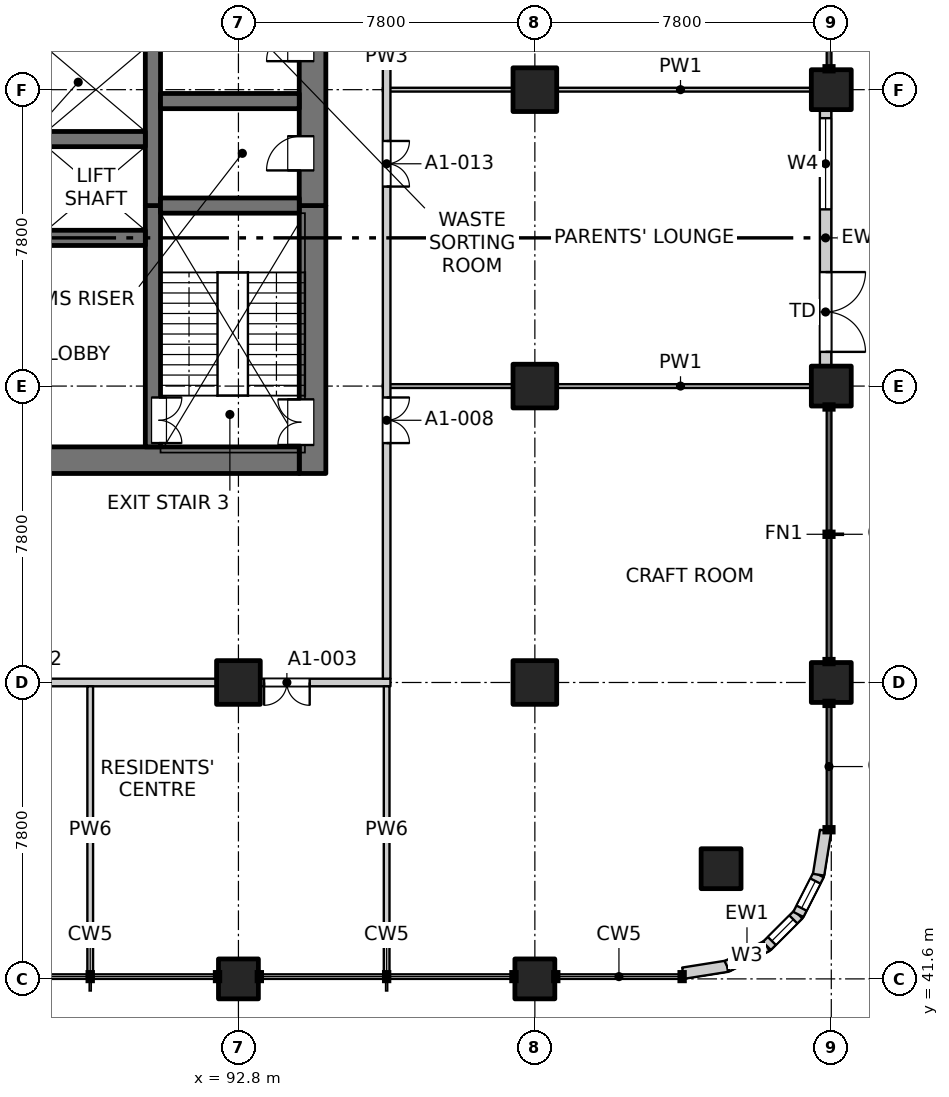
"""IFC4 building model, lengths in metres.
Left out: names, types, materials, properties, quantities, classifications, styles, units other than length and angle.
Written with IfcOpenShell. Run it as: python <this file> out.ifc"""

import sys

from ifc_helpers import new_model, si_unit, direction, frame, frame_2d, origin, origin_2d, place, context, subcontext, project, spatial, rectangle, extrude, element, fill, save


model = new_model("IFC4")
c1 = context("Model", 3, precision=1e-05, world=origin(), true_north=direction((0.0, 1.0)))
c2 = subcontext(c1, "Body", "Model", "MODEL_VIEW")
j1 = project(units=[si_unit("LENGTHUNIT", "METRE"), si_unit("PLANEANGLEUNIT", "RADIAN")], contexts=[c1])
p1 = place(None, origin())
s1 = spatial("IfcSite", under=j1, at=p1, CompositionType="ELEMENT")
p2 = place(p1, origin())
s2 = spatial("IfcBuilding", under=s1, at=p2, CompositionType="ELEMENT")
p3 = place(p2, frame((0.0, 0.0, 15.0)))
s3 = spatial("IfcBuildingStorey", under=s2, at=p3, CompositionType="ELEMENT", Elevation=15.0)
for number, where, z_axis, x_axis in (
    (1, (105.5, 44.5, -0.35), (0.0, 0.0, 1.0), (1.0, 0.0, 0.0)),
    (2, (108.4, 49.4, -0.35), (0.0, 0.0, 1.0), (1.0, 0.0, 0.0)),
    (3, (108.4, 57.2, -0.35), (0.0, 0.0, 1.0), (1.0, 0.0, 0.0)),
    (4, (108.4, 65.0, -0.35), (0.0, 0.0, 1.0), (1.0, 0.0, 0.0)),
    (5, (92.8, 41.6, -0.35), (0.0, 0.0, 1.0), (1.0, 0.0, 0.0)),
    (6, (100.6, 41.6, -0.35), (0.0, 0.0, 1.0), (1.0, 0.0, 0.0)),
):
    element("IfcColumn", number, at=place(p3, frame(where, z_axis=z_axis, x_axis=x_axis)), inside=s3, PredefinedType="COLUMN", context=c2, shape_type="SweptSolid", body=[
        extrude(rectangle(XDim=1.05, YDim=1.05, at=origin_2d()), origin(), (0.0, 0.0, 1.0), 4.6),
    ])
for number, where, z_axis, x_axis in (
    (7, (92.8, 49.4, -0.35), (0.0, 0.0, 1.0), (1.0, 0.0, 0.0)),
    (8, (100.6, 49.4, -0.35), (0.0, 0.0, 1.0), (1.0, 0.0, 0.0)),
    (9, (100.6, 57.2, -0.35), (0.0, 0.0, 1.0), (1.0, 0.0, 0.0)),
    (10, (100.6, 65.0, -0.35), (0.0, 0.0, 1.0), (1.0, 0.0, 0.0)),
):
    element("IfcColumn", number, at=place(p3, frame(where, z_axis=z_axis, x_axis=x_axis)), inside=s3, PredefinedType="COLUMN", context=c2, shape_type="SweptSolid", body=[
        extrude(rectangle(XDim=1.15, YDim=1.15, at=origin_2d()), origin(), (0.0, 0.0, 1.0), 4.6),
    ])
p4 = place(p3, frame((94.75, 54.9, -0.35), z_axis=(0.0, 0.0, 1.0), x_axis=(0.0, 1.0, 0.0)))
e11 = element("IfcWall", 11, at=p4, inside=s3, PredefinedType="SOLIDWALL", context=c2, shape_type="SweptSolid", body=[
    extrude(rectangle(XDim=7.05, YDim=0.7, at=frame_2d((3.525, 0.0))), origin(), (0.0, 0.0, 1.0), 4.6),
])
p5 = place(p4, frame((0.75, 0.0, 0.35)))
e12 = element("IfcOpeningElement", 12, at=p5, cuts=e11, PredefinedType="OPENING", context=c2, shape_type="SweptSolid", body=[
    extrude(rectangle(XDim=1.2, YDim=2.1, at=frame_2d((0.6, 1.05))), frame((0.0, 0.36, 0.0), z_axis=(0.0, -1.0, 0.0), x_axis=(1.0, 0.0, 0.0)), (0.0, 0.0, 1.0), 0.72),
])
p6 = place(p3, frame((94.75, 61.95, -0.35), z_axis=(0.0, 0.0, 1.0), x_axis=(0.0, 1.0, 0.0)))
e13 = element("IfcWall", 13, at=p6, inside=s3, PredefinedType="SOLIDWALL", context=c2, shape_type="SweptSolid", body=[
    extrude(rectangle(XDim=15.35, YDim=0.7, at=frame_2d((7.675, 0.0))), origin(), (0.0, 0.0, 1.0), 4.6),
])
p7 = place(p6, frame((0.925, 0.0, 0.35)))
e14 = element("IfcOpeningElement", 14, at=p7, cuts=e13, PredefinedType="OPENING", context=c2, shape_type="SweptSolid", body=[
    extrude(rectangle(XDim=0.9, YDim=2.1, at=frame_2d((0.45, 1.05))), frame((0.0, 0.36, 0.0), z_axis=(0.0, -1.0, 0.0), x_axis=(1.0, 0.0, 0.0)), (0.0, 0.0, 1.0), 0.72),
])
p8 = place(p6, frame((3.8, 0.0, 0.35)))
e15 = element("IfcOpeningElement", 15, at=p8, cuts=e13, PredefinedType="OPENING", context=c2, shape_type="SweptSolid", body=[
    extrude(rectangle(XDim=0.9, YDim=2.1, at=frame_2d((0.45, 1.05))), frame((0.0, 0.36, 0.0), z_axis=(0.0, -1.0, 0.0), x_axis=(1.0, 0.0, 0.0)), (0.0, 0.0, 1.0), 0.72),
])
p9 = place(p6, frame((6.8, 0.0, 0.35)))
e16 = element("IfcOpeningElement", 16, at=p9, cuts=e13, PredefinedType="OPENING", context=c2, shape_type="SweptSolid", body=[
    extrude(rectangle(XDim=0.9, YDim=2.1, at=frame_2d((0.45, 1.05))), frame((0.0, 0.36, 0.0), z_axis=(0.0, -1.0, 0.0), x_axis=(1.0, 0.0, 0.0)), (0.0, 0.0, 1.0), 0.72),
])
p10 = place(p6, frame((9.8, 0.0, 0.35)))
e17 = element("IfcOpeningElement", 17, at=p10, cuts=e13, PredefinedType="OPENING", context=c2, shape_type="SweptSolid", body=[
    extrude(rectangle(XDim=0.9, YDim=2.1, at=frame_2d((0.45, 1.05))), frame((0.0, 0.36, 0.0), z_axis=(0.0, -1.0, 0.0), x_axis=(1.0, 0.0, 0.0)), (0.0, 0.0, 1.0), 0.72),
])
p11 = place(p6, frame((13.1, 0.0, 0.35)))
e18 = element("IfcOpeningElement", 18, at=p11, cuts=e13, PredefinedType="OPENING", context=c2, shape_type="SweptSolid", body=[
    extrude(rectangle(XDim=0.9, YDim=2.1, at=frame_2d((0.45, 1.05))), frame((0.0, 0.36, 0.0), z_axis=(0.0, -1.0, 0.0), x_axis=(1.0, 0.0, 0.0)), (0.0, 0.0, 1.0), 0.72),
])
p12 = place(p3, frame((75.6, 55.25, -0.35), z_axis=(0.0, 0.0, 1.0), x_axis=(1.0, 0.0, 0.0)))
e19 = element("IfcWall", 19, at=p12, inside=s3, PredefinedType="SOLIDWALL", context=c2, shape_type="SweptSolid", body=[
    extrude(rectangle(XDim=18.8, YDim=0.7, at=frame_2d((9.4, 0.0))), origin(), (0.0, 0.0, 1.0), 4.6),
])
p13 = place(p12, frame((8.65, 0.0, 0.35)))
e20 = element("IfcOpeningElement", 20, at=p13, cuts=e19, PredefinedType="OPENING", context=c2, shape_type="SweptSolid", body=[
    extrude(rectangle(XDim=1.5, YDim=2.1, at=frame_2d((0.75, 1.05))), frame((0.0, 0.36, 0.0), z_axis=(0.0, -1.0, 0.0), x_axis=(1.0, 0.0, 0.0)), (0.0, 0.0, 1.0), 0.72),
])
p14 = place(p3, frame((90.55, 55.6, -0.35), z_axis=(0.0, 0.0, 1.0), x_axis=(0.0, 1.0, 0.0)))
e21 = element("IfcWall", 21, at=p14, inside=s3, PredefinedType="SOLIDWALL", context=c2, shape_type="SweptSolid", body=[
    extrude(rectangle(XDim=6.35, YDim=0.4, at=frame_2d((3.175, 0.0))), origin(), (0.0, 0.0, 1.0), 4.6),
])
p15 = place(p14, frame((0.1, 0.0, 0.35)))
e22 = element("IfcOpeningElement", 22, at=p15, cuts=e21, PredefinedType="OPENING", context=c2, shape_type="SweptSolid", body=[
    extrude(rectangle(XDim=1.2, YDim=2.1, at=frame_2d((0.6, 1.05))), frame((0.0, 0.21, 0.0), z_axis=(0.0, -1.0, 0.0), x_axis=(1.0, 0.0, 0.0)), (0.0, 0.0, 1.0), 0.42),
])
p16 = place(p3, frame((90.55, 61.95, -0.35), z_axis=(0.0, 0.0, 1.0), x_axis=(0.0, 1.0, 0.0)))
e23 = element("IfcWall", 23, at=p16, inside=s3, PredefinedType="SOLIDWALL", context=c2, shape_type="SweptSolid", body=[
    extrude(rectangle(XDim=15.35, YDim=0.4, at=frame_2d((7.675, 0.0))), origin(), (0.0, 0.0, 1.0), 4.6),
])
for number, where, z_axis, x_axis in (
    (24, (87.35, 61.1, -0.35), (0.0, 0.0, 1.0), (1.0, 0.0, 0.0)),
    (25, (87.35, 63.7, -0.35), (0.0, 0.0, 1.0), (1.0, 0.0, 0.0)),
):
    element("IfcWall", number, at=place(p3, frame(where, z_axis=z_axis, x_axis=x_axis)), inside=s3, PredefinedType="SOLIDWALL", context=c2, shape_type="SweptSolid", body=[
        extrude(rectangle(XDim=3.0, YDim=0.4, at=frame_2d((1.5, 0.0))), origin(), (0.0, 0.0, 1.0), 4.6),
    ])
for number, where, z_axis, x_axis in (
    (26, (90.75, 61.95, -0.35), (0.0, 0.0, 1.0), (1.0, 0.0, 0.0)),
    (27, (90.75, 64.7, -0.35), (0.0, 0.0, 1.0), (1.0, 0.0, 0.0)),
):
    element("IfcWall", number, at=place(p3, frame(where, z_axis=z_axis, x_axis=x_axis)), inside=s3, PredefinedType="SOLIDWALL", context=c2, shape_type="SweptSolid", body=[
        extrude(rectangle(XDim=3.65, YDim=0.4, at=frame_2d((1.825, 0.0))), origin(), (0.0, 0.0, 1.0), 4.6),
    ])
p17 = place(p3, frame((108.25, 57.725, 0.0), z_axis=(0.0, 0.0, 1.0), x_axis=(0.0, 1.0, 0.0)))
e28 = element("IfcWall", 28, at=p17, inside=s3, PredefinedType="SOLIDWALL", context=c2, shape_type="SweptSolid", body=[
    extrude(rectangle(XDim=6.75, YDim=0.3, at=frame_2d((3.375, 0.0))), origin(), (0.0, 0.0, 1.0), 3.8),
])
p18 = place(p17, frame((0.375, 0.0, 0.0)))
e29 = element("IfcOpeningElement", 29, at=p18, cuts=e28, PredefinedType="OPENING", context=c2, shape_type="SweptSolid", body=[
    extrude(rectangle(XDim=2.1, YDim=2.4, at=frame_2d((1.05, 1.2))), frame((0.0, 0.16, 0.0), z_axis=(0.0, -1.0, 0.0), x_axis=(1.0, 0.0, 0.0)), (0.0, 0.0, 1.0), 0.32),
])
p19 = place(p17, frame((4.125, 0.0, 0.6)))
e30 = element("IfcOpeningElement", 30, at=p19, cuts=e28, PredefinedType="OPENING", context=c2, shape_type="SweptSolid", body=[
    extrude(rectangle(XDim=2.4, YDim=2.1, at=frame_2d((1.2, 1.05))), frame((0.0, 0.16, 0.0), z_axis=(0.0, -1.0, 0.0), x_axis=(1.0, 0.0, 0.0)), (0.0, 0.0, 1.0), 0.32),
])
p20 = place(p3, frame((104.5, 41.75, 0.0), z_axis=(0.0, 0.0, 1.0), x_axis=(0.987678452879, 0.156496880861, 0.0)))
e31 = element("IfcWall", 31, at=p20, inside=s3, PredefinedType="SOLIDWALL", context=c2, shape_type="SweptSolid", body=[
    extrude(rectangle(XDim=1.173, YDim=0.3, at=frame_2d((0.586, 0.0))), origin(), (0.0, 0.0, 1.0), 3.8),
])
p21 = place(p3, frame((105.659, 41.934, 0.0), z_axis=(0.0, 0.0, 1.0), x_axis=(0.890988677504, 0.454025524128, 0.0)))
e32 = element("IfcWall", 32, at=p21, inside=s3, PredefinedType="SOLIDWALL", context=c2, shape_type="SweptSolid", body=[
    extrude(rectangle(XDim=1.173, YDim=0.3, at=frame_2d((0.587, 0.0))), origin(), (0.0, 0.0, 1.0), 3.8),
])
p22 = place(p21, frame((0.187, 0.0, 0.9)))
e33 = element("IfcOpeningElement", 33, at=p22, cuts=e32, PredefinedType="OPENING", context=c2, shape_type="SweptSolid", body=[
    extrude(rectangle(XDim=0.8, YDim=1.2, at=frame_2d((0.4, 0.6))), frame((0.0, 0.16, 0.0), z_axis=(0.0, -1.0, 0.0), x_axis=(1.0, 0.0, 0.0)), (0.0, 0.0, 1.0), 0.32),
])
p23 = place(p3, frame((106.704, 42.466, 0.0), z_axis=(0.0, 0.0, 1.0), x_axis=(0.707106781187, 0.707106781187, 0.0)))
e34 = element("IfcWall", 34, at=p23, inside=s3, PredefinedType="SOLIDWALL", context=c2, shape_type="SweptSolid", body=[
    extrude(rectangle(XDim=1.173, YDim=0.3, at=frame_2d((0.586, 0.0))), origin(), (0.0, 0.0, 1.0), 3.8),
])
p24 = place(p23, frame((0.187, 0.0, 0.9)))
e35 = element("IfcOpeningElement", 35, at=p24, cuts=e34, PredefinedType="OPENING", context=c2, shape_type="SweptSolid", body=[
    extrude(rectangle(XDim=0.8, YDim=1.2, at=frame_2d((0.4, 0.6))), frame((0.0, 0.16, 0.0), z_axis=(0.0, -1.0, 0.0), x_axis=(1.0, 0.0, 0.0)), (0.0, 0.0, 1.0), 0.32),
])
p25 = place(p3, frame((107.534, 43.296, 0.0), z_axis=(0.0, 0.0, 1.0), x_axis=(0.454025524128, 0.890988677504, 0.0)))
e36 = element("IfcWall", 36, at=p25, inside=s3, PredefinedType="SOLIDWALL", context=c2, shape_type="SweptSolid", body=[
    extrude(rectangle(XDim=1.173, YDim=0.3, at=frame_2d((0.587, 0.0))), origin(), (0.0, 0.0, 1.0), 3.8),
])
p26 = place(p25, frame((0.187, 0.0, 0.9)))
e37 = element("IfcOpeningElement", 37, at=p26, cuts=e36, PredefinedType="OPENING", context=c2, shape_type="SweptSolid", body=[
    extrude(rectangle(XDim=0.8, YDim=1.2, at=frame_2d((0.4, 0.6))), frame((0.0, 0.16, 0.0), z_axis=(0.0, -1.0, 0.0), x_axis=(1.0, 0.0, 0.0)), (0.0, 0.0, 1.0), 0.32),
])
p27 = place(p3, frame((108.066, 44.341, 0.0), z_axis=(0.0, 0.0, 1.0), x_axis=(0.156496880861, 0.987678452879, 0.0)))
e38 = element("IfcWall", 38, at=p27, inside=s3, PredefinedType="SOLIDWALL", context=c2, shape_type="SweptSolid", body=[
    extrude(rectangle(XDim=1.173, YDim=0.3, at=frame_2d((0.586, 0.0))), origin(), (0.0, 0.0, 1.0), 3.8),
])
p28 = place(p3, frame((73.2, 49.4, 0.0), z_axis=(0.0, 0.0, 1.0), x_axis=(1.0, 0.0, 0.0)))
e39 = element("IfcWall", 39, at=p28, inside=s3, PredefinedType="PARTITIONING", context=c2, shape_type="SweptSolid", body=[
    extrude(rectangle(XDim=23.6, YDim=0.2, at=frame_2d((11.8, 0.0))), origin(), (0.0, 0.0, 1.0), 4.25),
])
p29 = place(p28, frame((2.125, 0.0, 0.0)))
e40 = element("IfcOpeningElement", 40, at=p29, cuts=e39, PredefinedType="OPENING", context=c2, shape_type="SweptSolid", body=[
    extrude(rectangle(XDim=1.2, YDim=2.1, at=frame_2d((0.6, 1.05))), frame((0.0, 0.11, 0.0), z_axis=(0.0, -1.0, 0.0), x_axis=(1.0, 0.0, 0.0)), (0.0, 0.0, 1.0), 0.22),
])
p30 = place(p28, frame((12.5, 0.0, 0.0)))
e41 = element("IfcOpeningElement", 41, at=p30, cuts=e39, PredefinedType="OPENING", context=c2, shape_type="SweptSolid", body=[
    extrude(rectangle(XDim=1.2, YDim=2.1, at=frame_2d((0.6, 1.05))), frame((0.0, 0.11, 0.0), z_axis=(0.0, -1.0, 0.0), x_axis=(1.0, 0.0, 0.0)), (0.0, 0.0, 1.0), 0.22),
])
p31 = place(p28, frame((20.275, 0.0, 0.0)))
e42 = element("IfcOpeningElement", 42, at=p31, cuts=e39, PredefinedType="OPENING", context=c2, shape_type="SweptSolid", body=[
    extrude(rectangle(XDim=1.2, YDim=2.1, at=frame_2d((0.6, 1.05))), frame((0.0, 0.11, 0.0), z_axis=(0.0, -1.0, 0.0), x_axis=(1.0, 0.0, 0.0)), (0.0, 0.0, 1.0), 0.22),
])
p32 = place(p3, frame((96.6, 57.2, 0.0), z_axis=(0.0, 0.0, 1.0), x_axis=(1.0, 0.0, 0.0)))
e43 = element("IfcWall", 43, at=p32, inside=s3, PredefinedType="PARTITIONING", context=c2, shape_type="SweptSolid", body=[
    extrude(rectangle(XDim=4.0, YDim=0.1, at=frame_2d((2.0, 0.0))), origin(), (0.0, 0.0, 1.0), 4.25),
])
p33 = place(p3, frame((100.6, 57.2, 0.0), z_axis=(0.0, 0.0, 1.0), x_axis=(1.0, 0.0, 0.0)))
e44 = element("IfcWall", 44, at=p33, inside=s3, PredefinedType="PARTITIONING", context=c2, shape_type="SweptSolid", body=[
    extrude(rectangle(XDim=7.665, YDim=0.1, at=frame_2d((3.833, 0.0))), origin(), (0.0, 0.0, 1.0), 3.65),
])
p34 = place(p3, frame((96.6, 65.0, 0.0), z_axis=(0.0, 0.0, 1.0), x_axis=(1.0, 0.0, 0.0)))
e45 = element("IfcWall", 45, at=p34, inside=s3, PredefinedType="PARTITIONING", context=c2, shape_type="SweptSolid", body=[
    extrude(rectangle(XDim=4.0, YDim=0.1, at=frame_2d((2.0, 0.0))), origin(), (0.0, 0.0, 1.0), 4.25),
])
p35 = place(p3, frame((100.6, 65.0, 0.0), z_axis=(0.0, 0.0, 1.0), x_axis=(1.0, 0.0, 0.0)))
e46 = element("IfcWall", 46, at=p35, inside=s3, PredefinedType="PARTITIONING", context=c2, shape_type="SweptSolid", body=[
    extrude(rectangle(XDim=7.665, YDim=0.1, at=frame_2d((3.833, 0.0))), origin(), (0.0, 0.0, 1.0), 3.65),
])
for number, where, z_axis, x_axis in (
    (47, (88.9, 41.735, 0.0), (0.0, 0.0, 1.0), (0.0, 1.0, 0.0)),
    (48, (96.7, 41.735, 0.0), (0.0, 0.0, 1.0), (0.0, 1.0, 0.0)),
):
    element("IfcWall", number, at=place(p3, frame(where, z_axis=z_axis, x_axis=x_axis)), inside=s3, PredefinedType="PARTITIONING", context=c2, shape_type="SweptSolid", body=[
        extrude(rectangle(XDim=7.565, YDim=0.15, at=frame_2d((3.782, 0.0))), origin(), (0.0, 0.0, 1.0), 4.25),
    ])
p36 = place(p3, frame((96.7, 49.5, 0.0), z_axis=(0.0, 0.0, 1.0), x_axis=(0.0, 1.0, 0.0)))
e49 = element("IfcWall", 49, at=p36, inside=s3, PredefinedType="PARTITIONING", context=c2, shape_type="SweptSolid", body=[
    extrude(rectangle(XDim=34.9, YDim=0.2, at=frame_2d((17.45, 0.0))), origin(), (0.0, 0.0, 1.0), 4.25),
])
p37 = place(p36, frame((6.2, 0.0, 0.0)))
e50 = element("IfcOpeningElement", 50, at=p37, cuts=e49, PredefinedType="OPENING", context=c2, shape_type="SweptSolid", body=[
    extrude(rectangle(XDim=1.2, YDim=2.1, at=frame_2d((0.6, 1.05))), frame((0.0, 0.11, 0.0), z_axis=(0.0, -1.0, 0.0), x_axis=(1.0, 0.0, 0.0)), (0.0, 0.0, 1.0), 0.22),
])
p38 = place(p36, frame((12.95, 0.0, 0.0)))
e51 = element("IfcOpeningElement", 51, at=p38, cuts=e49, PredefinedType="OPENING", context=c2, shape_type="SweptSolid", body=[
    extrude(rectangle(XDim=1.2, YDim=2.1, at=frame_2d((0.6, 1.05))), frame((0.0, 0.11, 0.0), z_axis=(0.0, -1.0, 0.0), x_axis=(1.0, 0.0, 0.0)), (0.0, 0.0, 1.0), 0.22),
])
p39 = place(p36, frame((16.85, 0.0, 0.0)))
e52 = element("IfcOpeningElement", 52, at=p39, cuts=e49, PredefinedType="OPENING", context=c2, shape_type="SweptSolid", body=[
    extrude(rectangle(XDim=1.2, YDim=2.1, at=frame_2d((0.6, 1.05))), frame((0.0, 0.11, 0.0), z_axis=(0.0, -1.0, 0.0), x_axis=(1.0, 0.0, 0.0)), (0.0, 0.0, 1.0), 0.22),
])
p40 = place(p36, frame((32.45, 0.0, 0.0)))
e53 = element("IfcOpeningElement", 53, at=p40, cuts=e49, PredefinedType="OPENING", context=c2, shape_type="SweptSolid", body=[
    extrude(rectangle(XDim=1.2, YDim=2.1, at=frame_2d((0.6, 1.05))), frame((0.0, 0.11, 0.0), z_axis=(0.0, -1.0, 0.0), x_axis=(1.0, 0.0, 0.0)), (0.0, 0.0, 1.0), 0.22),
])
p41 = place(p18, frame((2.1, 0.0, 0.0), z_axis=(0.0, 0.0, 1.0), x_axis=(-1.0, 0.0, 0.0)))
e54 = element("IfcDoor", 54, at=p41, inside=s3, OperationType="DOUBLE_DOOR_SINGLE_SWING", PredefinedType="DOOR", context=c2, shape_type="SweptSolid", body=[
    extrude(rectangle(XDim=2.1, YDim=2.4, at=frame_2d((1.05, 1.2))), frame((0.0, 0.025, 0.0), z_axis=(0.0, -1.0, 0.0), x_axis=(1.0, 0.0, 0.0)), (0.0, 0.0, 1.0), 0.05),
])
fill(e29, e54)
p42 = place(p19, origin())
e55 = element("IfcWindow", 55, at=p42, inside=s3, PartitioningType="SINGLE_PANEL", PredefinedType="WINDOW", context=c2, shape_type="SweptSolid", body=[
    extrude(rectangle(XDim=2.4, YDim=2.1, at=frame_2d((1.2, 1.05))), frame((0.0, 0.03, 0.0), z_axis=(0.0, -1.0, 0.0), x_axis=(1.0, 0.0, 0.0)), (0.0, 0.0, 1.0), 0.06),
])
fill(e30, e55)
p43 = place(p22, origin())
e56 = element("IfcWindow", 56, at=p43, inside=s3, PartitioningType="SINGLE_PANEL", PredefinedType="WINDOW", context=c2, shape_type="SweptSolid", body=[
    extrude(rectangle(XDim=0.8, YDim=1.2, at=frame_2d((0.4, 0.6))), frame((0.0, 0.03, 0.0), z_axis=(0.0, -1.0, 0.0), x_axis=(1.0, 0.0, 0.0)), (0.0, 0.0, 1.0), 0.06),
])
fill(e33, e56)
p44 = place(p24, origin())
e57 = element("IfcWindow", 57, at=p44, inside=s3, PartitioningType="SINGLE_PANEL", PredefinedType="WINDOW", context=c2, shape_type="SweptSolid", body=[
    extrude(rectangle(XDim=0.8, YDim=1.2, at=frame_2d((0.4, 0.6))), frame((0.0, 0.03, 0.0), z_axis=(0.0, -1.0, 0.0), x_axis=(1.0, 0.0, 0.0)), (0.0, 0.0, 1.0), 0.06),
])
fill(e35, e57)
p45 = place(p26, origin())
e58 = element("IfcWindow", 58, at=p45, inside=s3, PartitioningType="SINGLE_PANEL", PredefinedType="WINDOW", context=c2, shape_type="SweptSolid", body=[
    extrude(rectangle(XDim=0.8, YDim=1.2, at=frame_2d((0.4, 0.6))), frame((0.0, 0.03, 0.0), z_axis=(0.0, -1.0, 0.0), x_axis=(1.0, 0.0, 0.0)), (0.0, 0.0, 1.0), 0.06),
])
fill(e37, e58)
p46 = place(p31, origin())
e59 = element("IfcDoor", 59, at=p46, inside=s3, OperationType="DOUBLE_DOOR_SINGLE_SWING", PredefinedType="DOOR", context=c2, shape_type="SweptSolid", body=[
    extrude(rectangle(XDim=1.2, YDim=2.1, at=frame_2d((0.6, 1.05))), frame((0.0, 0.025, 0.0), z_axis=(0.0, -1.0, 0.0), x_axis=(1.0, 0.0, 0.0)), (0.0, 0.0, 1.0), 0.05),
])
fill(e42, e59)
p47 = place(p15, origin())
e60 = element("IfcDoor", 60, at=p47, inside=s3, OperationType="DOUBLE_DOOR_SINGLE_SWING", PredefinedType="DOOR", context=c2, shape_type="SweptSolid", body=[
    extrude(rectangle(XDim=1.2, YDim=2.1, at=frame_2d((0.6, 1.05))), frame((0.0, -0.135, 0.0), z_axis=(0.0, -1.0, 0.0), x_axis=(1.0, 0.0, 0.0)), (0.0, 0.0, 1.0), 0.05),
])
fill(e22, e60)
p48 = place(p5, origin())
e61 = element("IfcDoor", 61, at=p48, inside=s3, OperationType="DOUBLE_DOOR_SINGLE_SWING", PredefinedType="DOOR", context=c2, shape_type="SweptSolid", body=[
    extrude(rectangle(XDim=1.2, YDim=2.1, at=frame_2d((0.6, 1.05))), frame((0.0, 0.335, 0.0), z_axis=(0.0, -1.0, 0.0), x_axis=(1.0, 0.0, 0.0)), (0.0, 0.0, 1.0), 0.05),
])
fill(e12, e61)
p49 = place(p37, origin())
e62 = element("IfcDoor", 62, at=p49, inside=s3, OperationType="DOUBLE_DOOR_SINGLE_SWING", PredefinedType="DOOR", context=c2, shape_type="SweptSolid", body=[
    extrude(rectangle(XDim=1.2, YDim=2.1, at=frame_2d((0.6, 1.05))), frame((0.0, 0.025, 0.0), z_axis=(0.0, -1.0, 0.0), x_axis=(1.0, 0.0, 0.0)), (0.0, 0.0, 1.0), 0.05),
])
fill(e50, e62)
p50 = place(p38, origin())
e63 = element("IfcDoor", 63, at=p50, inside=s3, OperationType="DOUBLE_DOOR_SINGLE_SWING", PredefinedType="DOOR", context=c2, shape_type="SweptSolid", body=[
    extrude(rectangle(XDim=1.2, YDim=2.1, at=frame_2d((0.6, 1.05))), frame((0.0, 0.025, 0.0), z_axis=(0.0, -1.0, 0.0), x_axis=(1.0, 0.0, 0.0)), (0.0, 0.0, 1.0), 0.05),
])
fill(e51, e63)
p51 = place(p7, origin())
e64 = element("IfcDoor", 64, at=p51, inside=s3, OperationType="SINGLE_SWING_LEFT", PredefinedType="DOOR", context=c2, shape_type="SweptSolid", body=[
    extrude(rectangle(XDim=0.9, YDim=2.1, at=frame_2d((0.45, 1.05))), frame((0.0, 0.335, 0.0), z_axis=(0.0, -1.0, 0.0), x_axis=(1.0, 0.0, 0.0)), (0.0, 0.0, 1.0), 0.05),
])
fill(e14, e64)
p52 = place(p8, origin())
e65 = element("IfcDoor", 65, at=p52, inside=s3, OperationType="SINGLE_SWING_LEFT", PredefinedType="DOOR", context=c2, shape_type="SweptSolid", body=[
    extrude(rectangle(XDim=0.9, YDim=2.1, at=frame_2d((0.45, 1.05))), frame((0.0, 0.335, 0.0), z_axis=(0.0, -1.0, 0.0), x_axis=(1.0, 0.0, 0.0)), (0.0, 0.0, 1.0), 0.05),
])
fill(e15, e65)
save(model, sys.argv[1])
